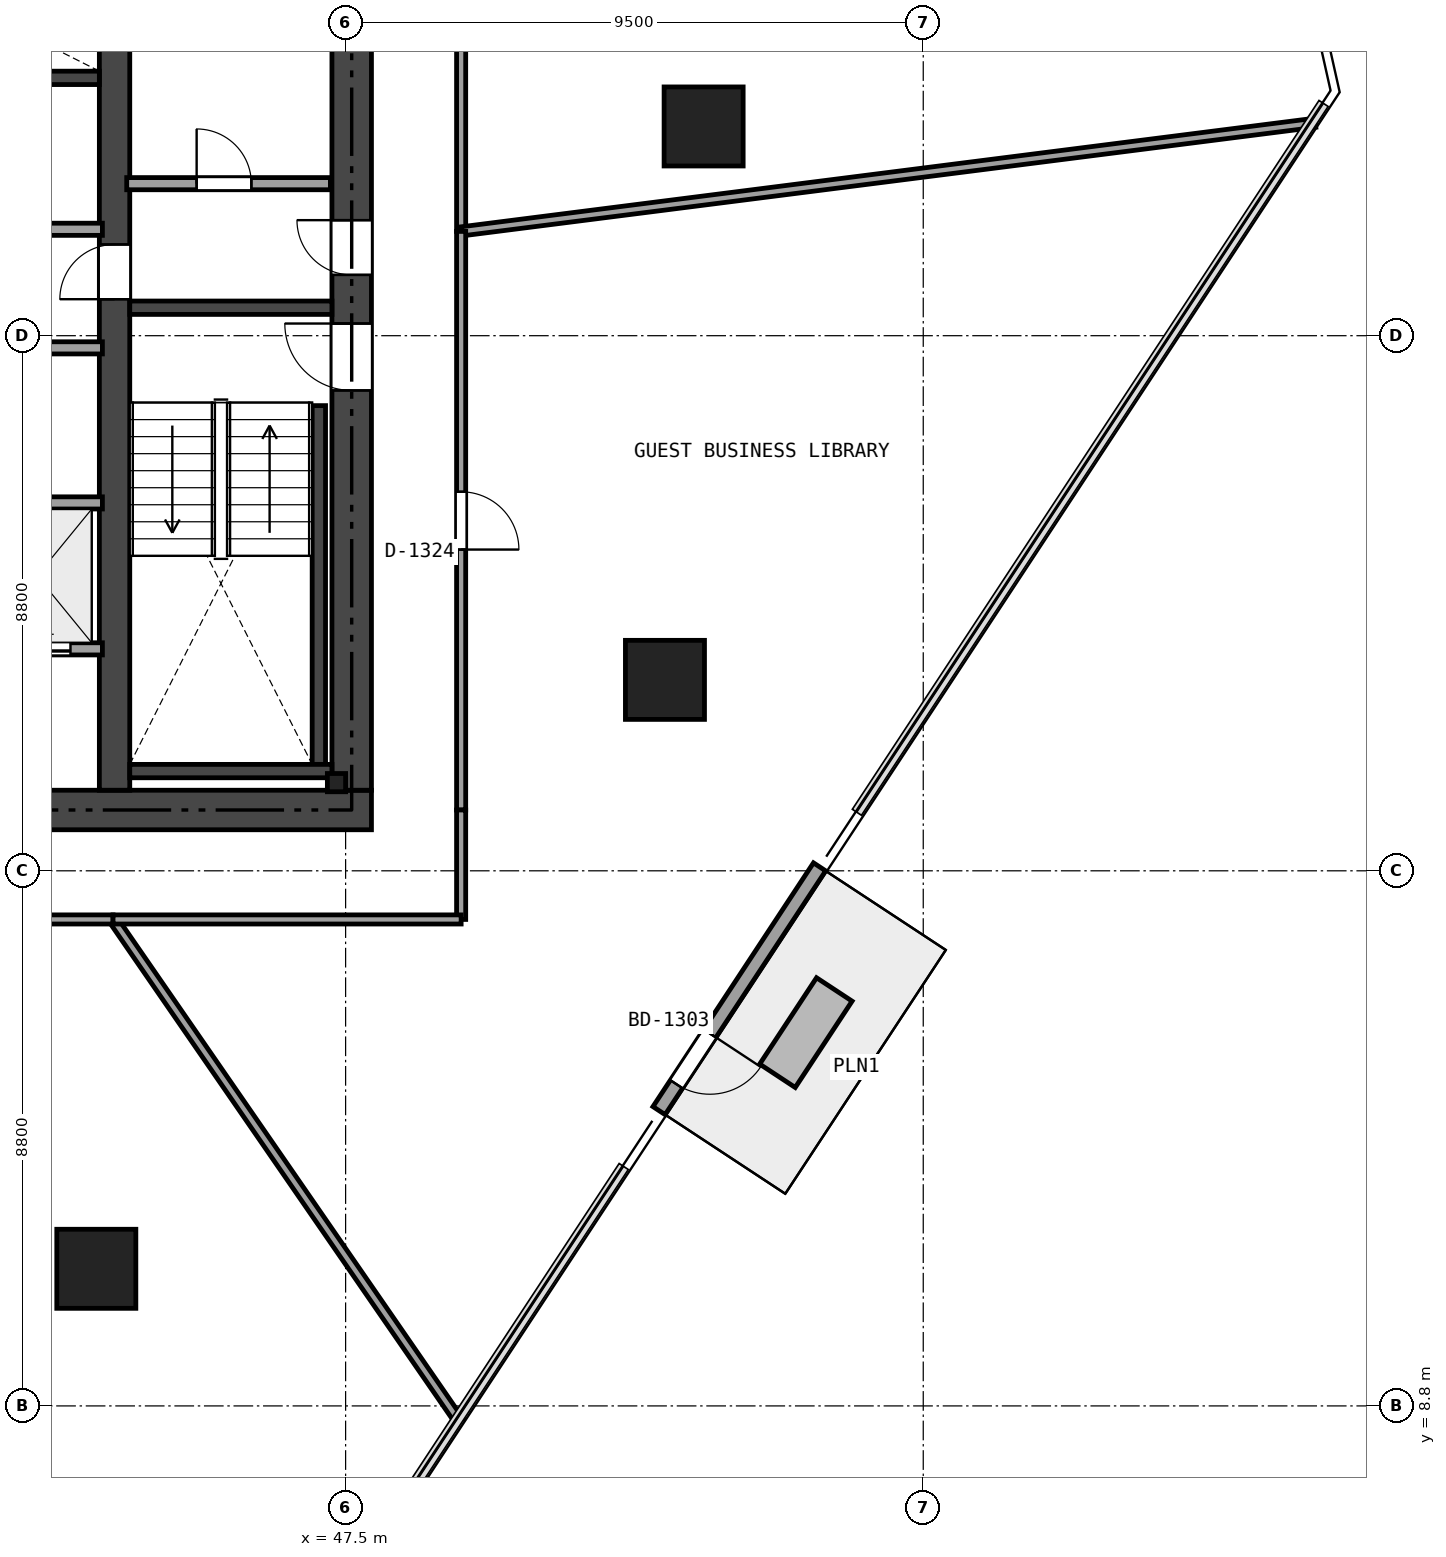
"""IFC4 building model, lengths in metres.
Left out: names, types, materials, properties, quantities, classifications, styles, units other than length and angle.
Written with IfcOpenShell. Run it as: python <this file> out.ifc"""

import sys

from ifc_helpers import new_model, si_unit, direction, frame, frame_2d, origin, origin_2d, place, context, subcontext, project, spatial, rectangle, i_section, extrude, element, fill, save


model = new_model("IFC4")
c1 = context("Model", 3, precision=1e-05, world=origin(), true_north=direction((0.0, 1.0)))
c2 = subcontext(c1, "Body", "Model", "MODEL_VIEW")
j1 = project(units=[si_unit("LENGTHUNIT", "METRE"), si_unit("PLANEANGLEUNIT", "RADIAN")], contexts=[c1])
p1 = place(None, origin())
s1 = spatial("IfcSite", under=j1, at=p1, CompositionType="ELEMENT")
p2 = place(p1, origin())
s2 = spatial("IfcBuilding", under=s1, at=p2, CompositionType="ELEMENT")
p3 = place(p2, frame((0.0, 0.0, 54.6)))
s3 = spatial("IfcBuildingStorey", under=s2, at=p3, CompositionType="ELEMENT", Elevation=54.6)
p4 = place(p3, frame((26.475, 18.6, 0.0), z_axis=(0.0, 0.0, 1.0), x_axis=(1.0, 0.0, 0.0)))
e1 = element("IfcWall", 1, at=p4, inside=s3, PredefinedType="SHEAR", context=c2, shape_type="SweptSolid", body=[
    extrude(rectangle(XDim=21.45, YDim=0.65, at=frame_2d((10.725, 0.0))), origin(), (0.0, 0.0, 1.0), 3.17),
])
p5 = place(p4, frame((12.45, 0.0, 0.0)))
e2 = element("IfcOpeningElement", 2, at=p5, cuts=e1, PredefinedType="OPENING", context=c2, shape_type="SweptSolid", body=[
    extrude(rectangle(XDim=1.15, YDim=2.15, at=frame_2d((0.575, 1.075))), frame((0.0, 0.335, 0.0), z_axis=(0.0, -1.0, 0.0), x_axis=(1.0, 0.0, 0.0)), (0.0, 0.0, 1.0), 0.67),
])
p6 = place(p4, frame((5.275, 0.0, 0.0)))
e3 = element("IfcOpeningElement", 3, at=p6, cuts=e1, PredefinedType="OPENING", context=c2, shape_type="SweptSolid", body=[
    extrude(rectangle(XDim=0.9, YDim=2.1, at=frame_2d((0.45, 1.05))), frame((0.0, 0.335, 0.0), z_axis=(0.0, -1.0, 0.0), x_axis=(1.0, 0.0, 0.0)), (0.0, 0.0, 1.0), 0.67),
])
p7 = place(p3, frame((47.6, 18.925, 0.0), z_axis=(0.0, 0.0, 1.0), x_axis=(0.0, 1.0, 0.0)))
e4 = element("IfcWall", 4, at=p7, inside=s3, PredefinedType="SHEAR", context=c2, shape_type="SweptSolid", body=[
    extrude(rectangle(XDim=14.95, YDim=0.65, at=frame_2d((7.475, 0.0))), origin(), (0.0, 0.0, 1.0), 3.17),
])
p8 = place(p7, frame((6.575, 0.0, 0.0)))
e5 = element("IfcOpeningElement", 5, at=p8, cuts=e4, PredefinedType="OPENING", context=c2, shape_type="SweptSolid", body=[
    extrude(rectangle(XDim=1.1, YDim=2.15, at=frame_2d((0.55, 1.075))), frame((0.0, 0.335, 0.0), z_axis=(0.0, -1.0, 0.0), x_axis=(1.0, 0.0, 0.0)), (0.0, 0.0, 1.0), 0.67),
])
p9 = place(p7, frame((8.475, 0.0, 0.0)))
e6 = element("IfcOpeningElement", 6, at=p9, cuts=e4, PredefinedType="OPENING", context=c2, shape_type="SweptSolid", body=[
    extrude(rectangle(XDim=0.9, YDim=2.1, at=frame_2d((0.45, 1.05))), frame((0.0, 0.335, 0.0), z_axis=(0.0, -1.0, 0.0), x_axis=(1.0, 0.0, 0.0)), (0.0, 0.0, 1.0), 0.67),
])
p10 = place(p7, frame((13.125, 0.0, 0.0)))
e7 = element("IfcOpeningElement", 7, at=p10, cuts=e4, PredefinedType="OPENING", context=c2, shape_type="SweptSolid", body=[
    extrude(rectangle(XDim=0.9, YDim=2.1, at=frame_2d((0.45, 1.05))), frame((0.0, 0.335, 0.0), z_axis=(0.0, -1.0, 0.0), x_axis=(1.0, 0.0, 0.0)), (0.0, 0.0, 1.0), 0.67),
])
p11 = place(p3, frame((43.7, 18.925, 0.0), z_axis=(0.0, 0.0, 1.0), x_axis=(0.0, 1.0, 0.0)))
e8 = element("IfcWall", 8, at=p11, inside=s3, PredefinedType="SHEAR", context=c2, shape_type="SweptSolid", body=[
    extrude(rectangle(XDim=14.95, YDim=0.5, at=frame_2d((7.475, 0.0))), origin(), (0.0, 0.0, 1.0), 3.17),
])
p12 = place(p11, frame((8.075, 0.0, 0.0)))
e9 = element("IfcOpeningElement", 9, at=p12, cuts=e8, PredefinedType="OPENING", context=c2, shape_type="SweptSolid", body=[
    extrude(rectangle(XDim=0.9, YDim=2.1, at=frame_2d((0.45, 1.05))), frame((0.0, 0.26, 0.0), z_axis=(0.0, -1.0, 0.0), x_axis=(1.0, 0.0, 0.0)), (0.0, 0.0, 1.0), 0.52),
])
p13 = place(p3, frame((43.95, 26.86, 0.0), z_axis=(0.0, 0.0, 1.0), x_axis=(1.0, 0.0, 0.0)))
e10 = element("IfcWall", 10, at=p13, inside=s3, PredefinedType="SHEAR", context=c2, shape_type="SweptSolid", body=[
    extrude(rectangle(XDim=3.325, YDim=0.22, at=frame_2d((1.663, 0.0))), origin(), (0.0, 0.0, 1.0), 3.17),
])
p14 = place(p3, frame((47.06, 19.35, 0.0), z_axis=(0.0, 0.0, 1.0), x_axis=(0.0, 1.0, 0.0)))
e11 = element("IfcWall", 11, at=p14, inside=s3, PredefinedType="SHEAR", context=c2, shape_type="SweptSolid", body=[
    extrude(rectangle(XDim=5.9, YDim=0.22, at=frame_2d((2.95, 0.0))), origin(), (0.0, 0.0, 1.0), 3.17),
])
p15 = place(p3, frame((43.95, 19.24, 0.0), z_axis=(0.0, 0.0, 1.0), x_axis=(1.0, 0.0, 0.0)))
e12 = element("IfcWall", 12, at=p15, inside=s3, PredefinedType="SHEAR", context=c2, shape_type="SweptSolid", body=[
    extrude(rectangle(XDim=3.325, YDim=0.22, at=frame_2d((1.663, 0.0))), origin(), (0.0, 0.0, 1.0), 3.17),
])
p16 = place(p3, frame((35.84, 30.64, 0.0), z_axis=(0.0, 0.0, 1.0), x_axis=(1.0, 0.0, 0.0)))
e13 = element("IfcWall", 13, at=p16, inside=s3, PredefinedType="SHEAR", context=c2, shape_type="SweptSolid", body=[
    extrude(rectangle(XDim=7.61, YDim=0.22, at=frame_2d((3.805, 0.0))), origin(), (0.0, 0.0, 1.0), 3.17),
])
for number, where, z_axis, x_axis in (
    (14, (53.388, 29.841, 0.0), (0.0, 0.0, 1.0), (1.0, 0.0, 0.0)),
    (15, (43.4, 11.055, 0.0), (0.0, 0.0, 1.0), (1.0, 0.0, 0.0)),
    (16, (52.752, 20.74, 0.0), (0.0, 0.0, 1.0), (1.0, 0.0, 0.0)),
):
    element("IfcColumn", number, at=place(p3, frame(where, z_axis=z_axis, x_axis=x_axis)), inside=s3, PredefinedType="COLUMN", context=c2, shape_type="SweptSolid", body=[
        extrude(rectangle(XDim=1.3, YDim=1.3, at=origin_2d()), origin(), (0.0, 0.0, 1.0), 3.17),
    ])
p17 = place(p3, frame((47.35, 19.05, 0.0), z_axis=(0.0, 0.0, 1.0), x_axis=(1.0, 0.0, 0.0)))
e17 = element("IfcColumn", 17, at=p17, inside=s3, PredefinedType="PILASTER", context=c2, shape_type="SweptSolid", body=[
    extrude(i_section(OverallWidth=0.3, OverallDepth=0.3, WebThickness=0.011, FlangeThickness=0.019, at=origin_2d()), origin(), (0.0, 0.0, 1.0), 3.17),
])
p18 = place(p3, frame((55.295, 17.665, 0.0), z_axis=(0.0, 0.0, 1.0), x_axis=(-0.549961149928, -0.835190237952, 0.0)))
e18 = element("IfcWall", 18, at=p18, inside=s3, PredefinedType="SOLIDWALL", context=c2, shape_type="SweptSolid", body=[
    extrude(rectangle(XDim=4.8, YDim=0.24, at=frame_2d((2.4, 0.0))), origin(), (0.0, 0.0, 1.0), 3.17),
])
p19 = place(p18, frame((3.28, 0.0, 0.0)))
e19 = element("IfcOpeningElement", 19, at=p19, cuts=e18, PredefinedType="OPENING", context=c2, shape_type="SweptSolid", body=[
    extrude(rectangle(XDim=1.0, YDim=2.15, at=frame_2d((0.5, 1.075))), frame((0.0, 0.13, 0.0), z_axis=(0.0, -1.0, 0.0), x_axis=(1.0, 0.0, 0.0)), (0.0, 0.0, 1.0), 0.26),
])
p20 = place(p3, frame((43.9, 28.9, 0.0), z_axis=(0.0, 0.0, 1.0), x_axis=(1.0, 0.0, 0.0)))
e20 = element("IfcWall", 20, at=p20, inside=s3, PredefinedType="SOLIDWALL", context=c2, shape_type="SweptSolid", body=[
    extrude(rectangle(XDim=3.35, YDim=0.2, at=frame_2d((1.675, 0.0))), origin(), (0.0, 0.0, 1.0), 3.17),
])
p21 = place(p20, frame((1.15, 0.0, 0.0)))
e21 = element("IfcOpeningElement", 21, at=p21, cuts=e20, PredefinedType="OPENING", context=c2, shape_type="SweptSolid", body=[
    extrude(rectangle(XDim=0.9, YDim=2.1, at=frame_2d((0.45, 1.05))), frame((0.0, 0.11, 0.0), z_axis=(0.0, -1.0, 0.0), x_axis=(1.0, 0.0, 0.0)), (0.0, 0.0, 1.0), 0.22),
])
for number, where, z_axis, x_axis in (
    (22, (35.62, 28.15, 0.0), (0.0, 0.0, 1.0), (1.0, 0.0, 0.0)),
    (23, (35.62, 26.2, 0.0), (0.0, 0.0, 1.0), (1.0, 0.0, 0.0)),
):
    element("IfcWall", number, at=place(p3, frame(where, z_axis=z_axis, x_axis=x_axis)), inside=s3, PredefinedType="SOLIDWALL", context=c2, shape_type="SweptSolid", body=[
        extrude(rectangle(XDim=7.88, YDim=0.2, at=frame_2d((3.94, 0.0))), origin(), (0.0, 0.0, 1.0), 3.17),
    ])
p22 = place(p3, frame((35.62, 23.65, 0.0), z_axis=(0.0, 0.0, 1.0), x_axis=(1.0, 0.0, 0.0)))
e24 = element("IfcWall", 24, at=p22, inside=s3, PredefinedType="SOLIDWALL", context=c2, shape_type="SweptSolid", body=[
    extrude(rectangle(XDim=7.88, YDim=0.2, at=frame_2d((3.94, 0.0))), origin(), (0.0, 0.0, 1.0), 2.691),
])
p23 = place(p3, frame((35.62, 21.25, 0.0), z_axis=(0.0, 0.0, 1.0), x_axis=(1.0, 0.0, 0.0)))
e25 = element("IfcWall", 25, at=p23, inside=s3, PredefinedType="SOLIDWALL", context=c2, shape_type="SweptSolid", body=[
    extrude(rectangle(XDim=7.88, YDim=0.2, at=frame_2d((3.94, 0.0))), origin(), (0.0, 0.0, 1.0), 3.17),
])
p24 = place(p23, frame((0.405, 0.0, 0.0)))
e26 = element("IfcOpeningElement", 26, at=p24, cuts=e25, PredefinedType="OPENING", context=c2, shape_type="SweptSolid", body=[
    extrude(rectangle(XDim=1.1, YDim=2.15, at=frame_2d((0.55, 1.075))), frame((0.0, 0.11, 0.0), z_axis=(0.0, -1.0, 0.0), x_axis=(1.0, 0.0, 0.0)), (0.0, 0.0, 1.0), 0.22),
])
p25 = place(p23, frame((2.355, 0.0, 0.0)))
e27 = element("IfcOpeningElement", 27, at=p25, cuts=e25, PredefinedType="OPENING", context=c2, shape_type="SweptSolid", body=[
    extrude(rectangle(XDim=1.1, YDim=2.15, at=frame_2d((0.55, 1.075))), frame((0.0, 0.11, 0.0), z_axis=(0.0, -1.0, 0.0), x_axis=(1.0, 0.0, 0.0)), (0.0, 0.0, 1.0), 0.22),
])
p26 = place(p23, frame((4.305, 0.0, 0.0)))
e28 = element("IfcOpeningElement", 28, at=p26, cuts=e25, PredefinedType="OPENING", context=c2, shape_type="SweptSolid", body=[
    extrude(rectangle(XDim=1.1, YDim=2.15, at=frame_2d((0.55, 1.075))), frame((0.0, 0.11, 0.0), z_axis=(0.0, -1.0, 0.0), x_axis=(1.0, 0.0, 0.0)), (0.0, 0.0, 1.0), 0.22),
])
p27 = place(p23, frame((6.255, 0.0, 0.0)))
e29 = element("IfcOpeningElement", 29, at=p27, cuts=e25, PredefinedType="OPENING", context=c2, shape_type="SweptSolid", body=[
    extrude(rectangle(XDim=1.1, YDim=2.15, at=frame_2d((0.55, 1.075))), frame((0.0, 0.11, 0.0), z_axis=(0.0, -1.0, 0.0), x_axis=(1.0, 0.0, 0.0)), (0.0, 0.0, 1.0), 0.22),
])
p28 = place(p3, frame((49.4, 34.2, 0.0), z_axis=(0.0, 0.0, 1.0), x_axis=(0.0, -1.0, 0.0)))
e30 = element("IfcWall", 30, at=p28, inside=s3, PredefinedType="PARTITIONING", context=c2, shape_type="SweptSolid", body=[
    extrude(rectangle(XDim=6.085, YDim=0.15, at=frame_2d((3.042, 0.0))), origin(), (0.0, 0.0, 1.0), 2.395),
])
p29 = place(p3, frame((49.4, 28.115, 0.0), z_axis=(0.0, 0.0, 1.0), x_axis=(0.992004152997, 0.126205231415, 0.0)))
e31 = element("IfcWall", 31, at=p29, inside=s3, PredefinedType="PARTITIONING", context=c2, shape_type="SweptSolid", body=[
    extrude(rectangle(XDim=14.16, YDim=0.15, at=frame_2d((7.08, 0.0))), origin(), (0.0, 0.0, 1.0), 2.355),
])
p30 = place(p3, frame((49.371, 8.547, 0.0), z_axis=(0.0, 0.0, 1.0), x_axis=(-0.568028196619, 0.823009093416, 0.0)))
e32 = element("IfcWall", 32, at=p30, inside=s3, PredefinedType="PARTITIONING", context=c2, shape_type="SweptSolid", body=[
    extrude(rectangle(XDim=10.028, YDim=0.15, at=frame_2d((5.014, 0.0))), origin(), (0.0, 0.0, 1.0), 2.355),
])
p31 = place(p3, frame((43.675, 16.8, 0.0), z_axis=(0.0, 0.0, 1.0), x_axis=(-1.0, 0.0, 0.0)))
e33 = element("IfcWall", 33, at=p31, inside=s3, PredefinedType="PARTITIONING", context=c2, shape_type="SweptSolid", body=[
    extrude(rectangle(XDim=9.594, YDim=0.15, at=frame_2d((4.797, 0.0))), origin(), (0.0, 0.0, 1.0), 2.395),
])
p32 = place(p31, frame((4.322, 0.0, 0.0)))
e34 = element("IfcOpeningElement", 34, at=p32, cuts=e33, PredefinedType="OPENING", context=c2, shape_type="SweptSolid", body=[
    extrude(rectangle(XDim=0.95, YDim=2.15, at=frame_2d((0.475, 1.075))), frame((0.0, 0.085, 0.0), z_axis=(0.0, -1.0, 0.0), x_axis=(1.0, 0.0, 0.0)), (0.0, 0.0, 1.0), 0.17),
])
p33 = place(p3, frame((49.4, 28.115, 0.0), z_axis=(0.0, 0.0, 1.0), x_axis=(0.0, -1.0, 0.0)))
e35 = element("IfcWall", 35, at=p33, inside=s3, PredefinedType="PARTITIONING", context=c2, shape_type="SweptSolid", body=[
    extrude(rectangle(XDim=9.515, YDim=0.15, at=frame_2d((4.757, 0.0))), origin(), (0.0, 0.0, 1.0), 2.395),
])
p34 = place(p33, frame((4.282, 0.0, 0.0)))
e36 = element("IfcOpeningElement", 36, at=p34, cuts=e35, PredefinedType="OPENING", context=c2, shape_type="SweptSolid", body=[
    extrude(rectangle(XDim=0.95, YDim=2.15, at=frame_2d((0.475, 1.075))), frame((0.0, 0.085, 0.0), z_axis=(0.0, -1.0, 0.0), x_axis=(1.0, 0.0, 0.0)), (0.0, 0.0, 1.0), 0.17),
])
p35 = place(p3, frame((49.4, 18.6, 0.0), z_axis=(0.0, 0.0, 1.0), x_axis=(0.0, -1.0, 0.0)))
e37 = element("IfcWall", 37, at=p35, inside=s3, PredefinedType="PARTITIONING", context=c2, shape_type="SweptSolid", body=[
    extrude(rectangle(XDim=1.8, YDim=0.15, at=frame_2d((0.9, 0.0))), origin(), (0.0, 0.0, 1.0), 2.355),
])
p36 = place(p3, frame((49.4, 16.8, 0.0), z_axis=(0.0, 0.0, 1.0), x_axis=(-1.0, 0.0, 0.0)))
e38 = element("IfcWall", 38, at=p36, inside=s3, PredefinedType="PARTITIONING", context=c2, shape_type="SweptSolid", body=[
    extrude(rectangle(XDim=5.725, YDim=0.15, at=frame_2d((2.862, 0.0))), origin(), (0.0, 0.0, 1.0), 2.355),
])
p37 = place(p19, origin())
e39 = element("IfcDoor", 39, at=p37, inside=s3, OperationType="SINGLE_SWING_LEFT", PredefinedType="DOOR", context=c2, shape_type="SweptSolid", body=[
    extrude(rectangle(XDim=1.0, YDim=2.15, at=frame_2d((0.5, 1.075))), frame((0.0, 0.025, 0.0), z_axis=(0.0, -1.0, 0.0), x_axis=(1.0, 0.0, 0.0)), (0.0, 0.0, 1.0), 0.05),
])
fill(e19, e39)
p38 = place(p8, origin())
e40 = element("IfcDoor", 40, at=p38, inside=s3, OperationType="SINGLE_SWING_RIGHT", PredefinedType="DOOR", context=c2, shape_type="SweptSolid", body=[
    extrude(rectangle(XDim=1.1, YDim=2.15, at=frame_2d((0.55, 1.075))), frame((0.0, 0.025, 0.0), z_axis=(0.0, -1.0, 0.0), x_axis=(1.0, 0.0, 0.0)), (0.0, 0.0, 1.0), 0.05),
])
fill(e5, e40)
p39 = place(p12, origin())
e41 = element("IfcDoor", 41, at=p39, inside=s3, OperationType="SINGLE_SWING_LEFT", PredefinedType="DOOR", context=c2, shape_type="SweptSolid", body=[
    extrude(rectangle(XDim=0.9, YDim=2.1, at=frame_2d((0.45, 1.05))), frame((0.0, 0.025, 0.0), z_axis=(0.0, -1.0, 0.0), x_axis=(1.0, 0.0, 0.0)), (0.0, 0.0, 1.0), 0.05),
])
fill(e9, e41)
p40 = place(p9, origin())
e42 = element("IfcDoor", 42, at=p40, inside=s3, OperationType="SINGLE_SWING_RIGHT", PredefinedType="DOOR", context=c2, shape_type="SweptSolid", body=[
    extrude(rectangle(XDim=0.9, YDim=2.1, at=frame_2d((0.45, 1.05))), frame((0.0, 0.025, 0.0), z_axis=(0.0, -1.0, 0.0), x_axis=(1.0, 0.0, 0.0)), (0.0, 0.0, 1.0), 0.05),
])
fill(e6, e42)
p41 = place(p21, origin())
e43 = element("IfcDoor", 43, at=p41, inside=s3, OperationType="SINGLE_SWING_LEFT", PredefinedType="DOOR", context=c2, shape_type="SweptSolid", body=[
    extrude(rectangle(XDim=0.9, YDim=2.1, at=frame_2d((0.45, 1.05))), frame((0.0, 0.025, 0.0), z_axis=(0.0, -1.0, 0.0), x_axis=(1.0, 0.0, 0.0)), (0.0, 0.0, 1.0), 0.05),
])
fill(e21, e43)
p42 = place(p27, origin())
e44 = element("IfcDoor", 44, at=p42, inside=s3, OperationType="SLIDING_TO_LEFT", PredefinedType="DOOR", context=c2, shape_type="SweptSolid", body=[
    extrude(rectangle(XDim=1.1, YDim=2.15, at=frame_2d((0.55, 1.075))), frame((0.0, 0.025, 0.0), z_axis=(0.0, -1.0, 0.0), x_axis=(1.0, 0.0, 0.0)), (0.0, 0.0, 1.0), 0.05),
])
fill(e29, e44)
p43 = place(p34, origin())
e45 = element("IfcDoor", 45, at=p43, inside=s3, OperationType="SINGLE_SWING_RIGHT", PredefinedType="DOOR", context=c2, shape_type="SweptSolid", body=[
    extrude(rectangle(XDim=0.95, YDim=2.15, at=frame_2d((0.475, 1.075))), frame((0.0, 0.025, 0.0), z_axis=(0.0, -1.0, 0.0), x_axis=(1.0, 0.0, 0.0)), (0.0, 0.0, 1.0), 0.05),
])
fill(e36, e45)
save(model, sys.argv[1])
